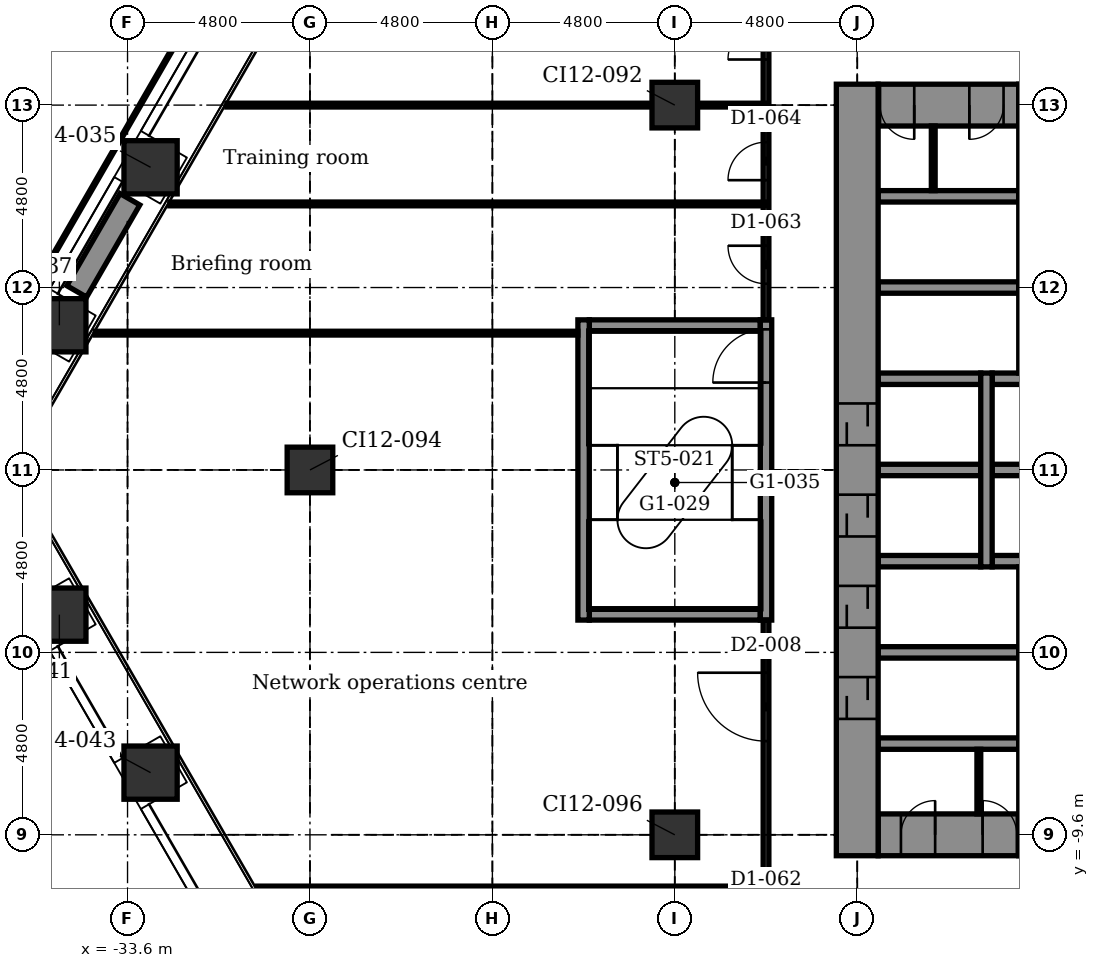
"""IFC4 building model, lengths in metres.
Left out: names, types, materials, properties, quantities, classifications, styles, units other than length and angle.
Written with IfcOpenShell. Run it as: python <this file> out.ifc"""

import sys

from ifc_helpers import new_model, si_unit, direction, frame, frame_2d, origin, origin_2d, place, context, subcontext, project, spatial, rectangle, extrude, element, fill, save


model = new_model("IFC4")
c1 = context("Model", 3, precision=1e-05, world=origin(), true_north=direction((0.0, 1.0)))
c2 = subcontext(c1, "Body", "Model", "MODEL_VIEW")
j1 = project(units=[si_unit("LENGTHUNIT", "METRE"), si_unit("PLANEANGLEUNIT", "RADIAN")], contexts=[c1])
p1 = place(None, origin())
s1 = spatial("IfcSite", under=j1, at=p1, CompositionType="ELEMENT")
p2 = place(p1, origin())
s2 = spatial("IfcBuilding", under=s1, at=p2, CompositionType="ELEMENT")
p3 = place(p2, frame((0.0, 0.0, 17.4)))
s3 = spatial("IfcBuildingStorey", under=s2, at=p3, CompositionType="ELEMENT", Elevation=17.4)
for number, where, z_axis, x_axis in (
    (1, (-32.994, -7.964, -0.25), (0.0, 0.0, 1.0), (0.866, 0.5, 0.0)),
    (2, (-35.394, -3.807, -0.25), (0.0, 0.0, 1.0), (0.866, 0.5, 0.0)),
    (3, (-35.394, 3.807, -0.25), (0.0, 0.0, 1.0), (0.5, 0.866, 0.0)),
    (4, (-32.994, 7.964, -0.25), (0.0, 0.0, 1.0), (0.5, 0.866, 0.0)),
):
    element("IfcColumn", number, at=place(p3, frame(where, z_axis=z_axis, x_axis=x_axis)), inside=s3, PredefinedType="COLUMN", context=c2, shape_type="SweptSolid", body=[
        extrude(rectangle(XDim=1.4, YDim=1.4, at=origin_2d()), origin(), (0.0, 0.0, 1.0), 5.0),
    ])
for number, where, z_axis, x_axis in (
    (5, (-28.8, 0.0, -0.25), (0.0, 0.0, 1.0), (1.0, 0.0, 0.0)),
    (6, (-19.2, -9.6, -0.25), (0.0, 0.0, 1.0), (1.0, 0.0, 0.0)),
    (7, (-19.2, 9.6, -0.25), (0.0, 0.0, 1.0), (1.0, 0.0, 0.0)),
):
    element("IfcColumn", number, at=place(p3, frame(where, z_axis=z_axis, x_axis=x_axis)), inside=s3, PredefinedType="COLUMN", context=c2, shape_type="SweptSolid", body=[
        extrude(rectangle(XDim=1.2, YDim=1.2, at=origin_2d()), origin(), (0.0, 0.0, 1.0), 5.0),
    ])
p4 = place(p3, frame((-13.85, -9.6, -0.25), z_axis=(0.0, 0.0, 1.0), x_axis=(1.0, 0.0, 0.0)))
e8 = element("IfcWall", 8, at=p4, inside=s3, PredefinedType="SHEAR", context=c2, shape_type="SweptSolid", body=[
    extrude(rectangle(XDim=3.7, YDim=1.1, at=frame_2d((1.85, 0.0))), origin(), (0.0, 0.0, 1.0), 5.0),
])
p5 = place(p4, frame((0.6, 0.0, 0.25)))
e9 = element("IfcOpeningElement", 9, at=p5, cuts=e8, PredefinedType="OPENING", context=c2, shape_type="SweptSolid", body=[
    extrude(rectangle(XDim=0.9, YDim=2.1, at=frame_2d((0.45, 1.05))), frame((0.0, 0.56, 0.0), z_axis=(0.0, -1.0, 0.0), x_axis=(1.0, 0.0, 0.0)), (0.0, 0.0, 1.0), 1.12),
])
p6 = place(p4, frame((2.75, 0.0, 0.25)))
e10 = element("IfcOpeningElement", 10, at=p6, cuts=e8, PredefinedType="OPENING", context=c2, shape_type="SweptSolid", body=[
    extrude(rectangle(XDim=0.9, YDim=2.1, at=frame_2d((0.45, 1.05))), frame((0.0, 0.56, 0.0), z_axis=(0.0, -1.0, 0.0), x_axis=(1.0, 0.0, 0.0)), (0.0, 0.0, 1.0), 1.12),
])
for number, where, z_axis, x_axis in (
    (11, (-13.85, -7.2, -0.25), (0.0, 0.0, 1.0), (1.0, 0.0, 0.0)),
    (12, (-13.85, -4.8, -0.25), (0.0, 0.0, 1.0), (1.0, 0.0, 0.0)),
):
    element("IfcWall", number, at=place(p3, frame(where, z_axis=z_axis, x_axis=x_axis)), inside=s3, PredefinedType="STANDARD", context=c2, shape_type="SweptSolid", body=[
        extrude(rectangle(XDim=3.7, YDim=0.3, at=frame_2d((1.85, 0.0))), origin(), (0.0, 0.0, 1.0), 5.0),
    ])
p7 = place(p3, frame((-21.45, -3.8, -0.25), z_axis=(0.0, 0.0, 1.0), x_axis=(1.0, 0.0, 0.0)))
e13 = element("IfcWall", 13, at=p7, inside=s3, PredefinedType="STANDARD", context=c2, shape_type="SweptSolid", body=[
    extrude(rectangle(XDim=4.5, YDim=0.3, at=frame_2d((2.25, 0.0))), origin(), (0.0, 0.0, 1.0), 5.0),
])
p8 = place(p3, frame((-13.85, -2.4, -0.25), z_axis=(0.0, 0.0, 1.0), x_axis=(1.0, 0.0, 0.0)))
e14 = element("IfcWall", 14, at=p8, inside=s3, PredefinedType="STANDARD", context=c2, shape_type="SweptSolid", body=[
    extrude(rectangle(XDim=2.7, YDim=0.3, at=frame_2d((1.35, 0.0))), origin(), (0.0, 0.0, 1.0), 5.0),
])
p9 = place(p3, frame((-10.85, -2.4, -0.25), z_axis=(0.0, 0.0, 1.0), x_axis=(1.0, 0.0, 0.0)))
e15 = element("IfcWall", 15, at=p9, inside=s3, PredefinedType="STANDARD", context=c2, shape_type="SweptSolid", body=[
    extrude(rectangle(XDim=1.1, YDim=0.3, at=frame_2d((0.55, 0.0))), origin(), (0.0, 0.0, 1.0), 5.0),
])
p10 = place(p3, frame((-13.85, 0.0, -0.25), z_axis=(0.0, 0.0, 1.0), x_axis=(1.0, 0.0, 0.0)))
e16 = element("IfcWall", 16, at=p10, inside=s3, PredefinedType="STANDARD", context=c2, shape_type="SweptSolid", body=[
    extrude(rectangle(XDim=2.7, YDim=0.3, at=frame_2d((1.35, 0.0))), origin(), (0.0, 0.0, 1.0), 5.0),
])
p11 = place(p3, frame((-10.85, 0.0, -0.25), z_axis=(0.0, 0.0, 1.0), x_axis=(1.0, 0.0, 0.0)))
e17 = element("IfcWall", 17, at=p11, inside=s3, PredefinedType="STANDARD", context=c2, shape_type="SweptSolid", body=[
    extrude(rectangle(XDim=3.3, YDim=0.3, at=frame_2d((1.65, 0.0))), origin(), (0.0, 0.0, 1.0), 5.0),
])
p12 = place(p3, frame((-13.85, 2.4, -0.25), z_axis=(0.0, 0.0, 1.0), x_axis=(1.0, 0.0, 0.0)))
e18 = element("IfcWall", 18, at=p12, inside=s3, PredefinedType="STANDARD", context=c2, shape_type="SweptSolid", body=[
    extrude(rectangle(XDim=2.7, YDim=0.3, at=frame_2d((1.35, 0.0))), origin(), (0.0, 0.0, 1.0), 5.0),
])
p13 = place(p3, frame((-10.85, 2.4, -0.25), z_axis=(0.0, 0.0, 1.0), x_axis=(1.0, 0.0, 0.0)))
e19 = element("IfcWall", 19, at=p13, inside=s3, PredefinedType="STANDARD", context=c2, shape_type="SweptSolid", body=[
    extrude(rectangle(XDim=1.1, YDim=0.3, at=frame_2d((0.55, 0.0))), origin(), (0.0, 0.0, 1.0), 5.0),
])
p14 = place(p3, frame((-21.45, 3.8, -0.25), z_axis=(0.0, 0.0, 1.0), x_axis=(1.0, 0.0, 0.0)))
e20 = element("IfcWall", 20, at=p14, inside=s3, PredefinedType="STANDARD", context=c2, shape_type="SweptSolid", body=[
    extrude(rectangle(XDim=4.5, YDim=0.3, at=frame_2d((2.25, 0.0))), origin(), (0.0, 0.0, 1.0), 5.0),
])
for number, where, z_axis, x_axis in (
    (21, (-13.85, 4.8, -0.25), (0.0, 0.0, 1.0), (1.0, 0.0, 0.0)),
    (22, (-13.85, 7.2, -0.25), (0.0, 0.0, 1.0), (1.0, 0.0, 0.0)),
):
    element("IfcWall", number, at=place(p3, frame(where, z_axis=z_axis, x_axis=x_axis)), inside=s3, PredefinedType="STANDARD", context=c2, shape_type="SweptSolid", body=[
        extrude(rectangle(XDim=3.7, YDim=0.3, at=frame_2d((1.85, 0.0))), origin(), (0.0, 0.0, 1.0), 5.0),
    ])
p15 = place(p3, frame((-13.85, 9.6, -0.25), z_axis=(0.0, 0.0, 1.0), x_axis=(1.0, 0.0, 0.0)))
e23 = element("IfcWall", 23, at=p15, inside=s3, PredefinedType="SHEAR", context=c2, shape_type="SweptSolid", body=[
    extrude(rectangle(XDim=3.7, YDim=1.1, at=frame_2d((1.85, 0.0))), origin(), (0.0, 0.0, 1.0), 5.0),
])
p16 = place(p15, frame((0.05, 0.0, 0.25)))
e24 = element("IfcOpeningElement", 24, at=p16, cuts=e23, PredefinedType="OPENING", context=c2, shape_type="SweptSolid", body=[
    extrude(rectangle(XDim=0.9, YDim=2.1, at=frame_2d((0.45, 1.05))), frame((0.0, 0.56, 0.0), z_axis=(0.0, -1.0, 0.0), x_axis=(1.0, 0.0, 0.0)), (0.0, 0.0, 1.0), 1.12),
])
p17 = place(p15, frame((2.4, 0.0, 0.25)))
e25 = element("IfcOpeningElement", 25, at=p17, cuts=e23, PredefinedType="OPENING", context=c2, shape_type="SweptSolid", body=[
    extrude(rectangle(XDim=0.9, YDim=2.1, at=frame_2d((0.45, 1.05))), frame((0.0, 0.56, 0.0), z_axis=(0.0, -1.0, 0.0), x_axis=(1.0, 0.0, 0.0)), (0.0, 0.0, 1.0), 1.12),
])
p18 = place(p3, frame((-21.6, -3.95, -0.25), z_axis=(0.0, 0.0, 1.0), x_axis=(0.0, 1.0, 0.0)))
e26 = element("IfcWall", 26, at=p18, inside=s3, PredefinedType="STANDARD", context=c2, shape_type="SweptSolid", body=[
    extrude(rectangle(XDim=7.9, YDim=0.3, at=frame_2d((3.95, 0.0))), origin(), (0.0, 0.0, 1.0), 5.0),
])
p19 = place(p3, frame((-16.8, -3.95, -0.25), z_axis=(0.0, 0.0, 1.0), x_axis=(0.0, 1.0, 0.0)))
e27 = element("IfcWall", 27, at=p19, inside=s3, PredefinedType="STANDARD", context=c2, shape_type="SweptSolid", body=[
    extrude(rectangle(XDim=7.9, YDim=0.3, at=frame_2d((3.95, 0.0))), origin(), (0.0, 0.0, 1.0), 5.0),
])
p20 = place(p19, frame((6.25, 0.0, 0.25)))
e28 = element("IfcOpeningElement", 28, at=p20, cuts=e27, PredefinedType="OPENING", context=c2, shape_type="SweptSolid", body=[
    extrude(rectangle(XDim=1.4, YDim=2.1, at=frame_2d((0.7, 1.05))), frame((0.0, 0.16, 0.0), z_axis=(0.0, -1.0, 0.0), x_axis=(1.0, 0.0, 0.0)), (0.0, 0.0, 1.0), 0.32),
])
p21 = place(p3, frame((-14.4, -10.15, -0.25), z_axis=(0.0, 0.0, 1.0), x_axis=(0.0, 1.0, 0.0)))
e29 = element("IfcWall", 29, at=p21, inside=s3, PredefinedType="SHEAR", context=c2, shape_type="SweptSolid", body=[
    extrude(rectangle(XDim=20.3, YDim=1.1, at=frame_2d((10.15, 0.0))), origin(), (0.0, 0.0, 1.0), 5.0),
])
p22 = place(p21, frame((3.6, 0.0, 0.25)))
e30 = element("IfcOpeningElement", 30, at=p22, cuts=e29, PredefinedType="OPENING", context=c2, shape_type="SweptSolid", body=[
    extrude(rectangle(XDim=1.1, YDim=2.1, at=frame_2d((0.55, 1.05))), frame((0.0, 0.56, 0.0), z_axis=(0.0, -1.0, 0.0), x_axis=(1.0, 0.0, 0.0)), (0.0, 0.0, 1.0), 1.12),
])
p23 = place(p21, frame((6.0, 0.0, 0.25)))
e31 = element("IfcOpeningElement", 31, at=p23, cuts=e29, PredefinedType="OPENING", context=c2, shape_type="SweptSolid", body=[
    extrude(rectangle(XDim=1.1, YDim=2.1, at=frame_2d((0.55, 1.05))), frame((0.0, 0.56, 0.0), z_axis=(0.0, -1.0, 0.0), x_axis=(1.0, 0.0, 0.0)), (0.0, 0.0, 1.0), 1.12),
])
p24 = place(p21, frame((8.4, 0.0, 0.25)))
e32 = element("IfcOpeningElement", 32, at=p24, cuts=e29, PredefinedType="OPENING", context=c2, shape_type="SweptSolid", body=[
    extrude(rectangle(XDim=1.1, YDim=2.1, at=frame_2d((0.55, 1.05))), frame((0.0, 0.56, 0.0), z_axis=(0.0, -1.0, 0.0), x_axis=(1.0, 0.0, 0.0)), (0.0, 0.0, 1.0), 1.12),
])
p25 = place(p21, frame((10.8, 0.0, 0.25)))
e33 = element("IfcOpeningElement", 33, at=p25, cuts=e29, PredefinedType="OPENING", context=c2, shape_type="SweptSolid", body=[
    extrude(rectangle(XDim=1.1, YDim=2.1, at=frame_2d((0.55, 1.05))), frame((0.0, 0.56, 0.0), z_axis=(0.0, -1.0, 0.0), x_axis=(1.0, 0.0, 0.0)), (0.0, 0.0, 1.0), 1.12),
])
p26 = place(p3, frame((-11.0, -2.55, -0.25), z_axis=(0.0, 0.0, 1.0), x_axis=(0.0, 1.0, 0.0)))
e34 = element("IfcWall", 34, at=p26, inside=s3, PredefinedType="STANDARD", context=c2, shape_type="SweptSolid", body=[
    extrude(rectangle(XDim=5.1, YDim=0.3, at=frame_2d((2.55, 0.0))), origin(), (0.0, 0.0, 1.0), 5.0),
])
for number, where, z_axis, x_axis in (
    (35, (-9.6, -10.15, -0.25), (0.0, 0.0, 1.0), (0.0, 1.0, 0.0)),
    (36, (-9.6, 2.55, -0.25), (0.0, 0.0, 1.0), (0.0, 1.0, 0.0)),
):
    element("IfcWall", number, at=place(p3, frame(where, z_axis=z_axis, x_axis=x_axis)), inside=s3, PredefinedType="SHEAR", context=c2, shape_type="SweptSolid", body=[
        extrude(rectangle(XDim=7.6, YDim=1.1, at=frame_2d((3.8, 0.0))), origin(), (0.0, 0.0, 1.0), 5.0),
    ])
p27 = place(p3, frame((-34.937, 4.698, 0.0), z_axis=(0.0, 0.0, 1.0), x_axis=(0.49998411664, 0.866034573852, 0.0)))
e37 = element("IfcWall", 37, at=p27, inside=s3, PredefinedType="USERDEFINED", context=c2, shape_type="SweptSolid", body=[
    extrude(rectangle(XDim=2.8, YDim=0.6, at=frame_2d((1.4, 0.0))), origin(), (0.0, 0.0, 1.0), 0.7),
])
for number, where, z_axis, x_axis in (
    (38, (-11.2, -9.05, 0.0), (0.0, 0.0, 1.0), (0.0, 1.0, 0.0)),
    (39, (-12.4, 7.35, 0.0), (0.0, 0.0, 1.0), (0.0, 1.0, 0.0)),
):
    element("IfcWall", number, at=place(p3, frame(where, z_axis=z_axis, x_axis=x_axis)), inside=s3, PredefinedType="PARTITIONING", context=c2, shape_type="SweptSolid", body=[
        extrude(rectangle(XDim=1.7, YDim=0.1, at=frame_2d((0.85, 0.0))), origin(), (0.0, 0.0, 1.0), 4.75),
    ])
p28 = place(p3, frame((-16.8, -13.0, 0.0), z_axis=(0.0, 0.0, 1.0), x_axis=(0.0, 1.0, 0.0)))
e40 = element("IfcWall", 40, at=p28, inside=s3, PredefinedType="PARTITIONING", context=c2, shape_type="SweptSolid", body=[
    extrude(rectangle(XDim=9.05, YDim=0.15, at=frame_2d((4.525, 0.0))), origin(), (0.0, 0.0, 1.0), 4.75),
])
p29 = place(p28, frame((0.6, 0.0, 0.0)))
e41 = element("IfcOpeningElement", 41, at=p29, cuts=e40, PredefinedType="OPENING", context=c2, shape_type="SweptSolid", body=[
    extrude(rectangle(XDim=1.0, YDim=2.1, at=frame_2d((0.5, 1.05))), frame((0.0, 0.085, 0.0), z_axis=(0.0, -1.0, 0.0), x_axis=(1.0, 0.0, 0.0)), (0.0, 0.0, 1.0), 0.17),
])
p30 = place(p28, frame((5.865, 0.0, 0.0)))
e42 = element("IfcOpeningElement", 42, at=p30, cuts=e40, PredefinedType="OPENING", context=c2, shape_type="SweptSolid", body=[
    extrude(rectangle(XDim=1.8, YDim=2.1, at=frame_2d((0.9, 1.05))), frame((0.0, 0.085, 0.0), z_axis=(0.0, -1.0, 0.0), x_axis=(1.0, 0.0, 0.0)), (0.0, 0.0, 1.0), 0.17),
])
p31 = place(p3, frame((-16.8, 3.95, 0.0), z_axis=(0.0, 0.0, 1.0), x_axis=(0.0, 1.0, 0.0)))
e43 = element("IfcWall", 43, at=p31, inside=s3, PredefinedType="PARTITIONING", context=c2, shape_type="SweptSolid", body=[
    extrude(rectangle(XDim=9.35, YDim=0.15, at=frame_2d((4.675, 0.0))), origin(), (0.0, 0.0, 1.0), 4.75),
])
p32 = place(p31, frame((0.95, 0.0, 0.0)))
e44 = element("IfcOpeningElement", 44, at=p32, cuts=e43, PredefinedType="OPENING", context=c2, shape_type="SweptSolid", body=[
    extrude(rectangle(XDim=1.0, YDim=2.1, at=frame_2d((0.5, 1.05))), frame((0.0, 0.085, 0.0), z_axis=(0.0, -1.0, 0.0), x_axis=(1.0, 0.0, 0.0)), (0.0, 0.0, 1.0), 0.17),
])
p33 = place(p31, frame((3.675, 0.0, 0.0)))
e45 = element("IfcOpeningElement", 45, at=p33, cuts=e43, PredefinedType="OPENING", context=c2, shape_type="SweptSolid", body=[
    extrude(rectangle(XDim=1.0, YDim=2.1, at=frame_2d((0.5, 1.05))), frame((0.0, 0.085, 0.0), z_axis=(0.0, -1.0, 0.0), x_axis=(1.0, 0.0, 0.0)), (0.0, 0.0, 1.0), 0.17),
])
p34 = place(p31, frame((6.85, 0.0, 0.0)))
e46 = element("IfcOpeningElement", 46, at=p34, cuts=e43, PredefinedType="OPENING", context=c2, shape_type="SweptSolid", body=[
    extrude(rectangle(XDim=1.0, YDim=2.1, at=frame_2d((0.5, 1.05))), frame((0.0, 0.085, 0.0), z_axis=(0.0, -1.0, 0.0), x_axis=(1.0, 0.0, 0.0)), (0.0, 0.0, 1.0), 0.17),
])
p35 = place(p3, frame((-30.178, -11.0, 0.0), z_axis=(0.0, 0.0, 1.0), x_axis=(1.0, 0.0, 0.0)))
e47 = element("IfcWall", 47, at=p35, inside=s3, PredefinedType="PARTITIONING", context=c2, shape_type="SweptSolid", body=[
    extrude(rectangle(XDim=13.378, YDim=0.1, at=frame_2d((6.689, 0.0))), origin(), (0.0, 0.0, 1.0), 4.75),
])
p36 = place(p3, frame((-34.451, 3.6, 0.0), z_axis=(0.0, 0.0, 1.0), x_axis=(1.0, 0.0, 0.0)))
e48 = element("IfcWall", 48, at=p36, inside=s3, PredefinedType="PARTITIONING", context=c2, shape_type="SweptSolid", body=[
    extrude(rectangle(XDim=12.701, YDim=0.1, at=frame_2d((6.351, 0.0))), origin(), (0.0, 0.0, 1.0), 4.75),
])
p37 = place(p3, frame((-32.488, 7.0, 0.0), z_axis=(0.0, 0.0, 1.0), x_axis=(1.0, 0.0, 0.0)))
e49 = element("IfcWall", 49, at=p37, inside=s3, PredefinedType="PARTITIONING", context=c2, shape_type="SweptSolid", body=[
    extrude(rectangle(XDim=15.688, YDim=0.1, at=frame_2d((7.844, 0.0))), origin(), (0.0, 0.0, 1.0), 4.75),
])
p38 = place(p3, frame((-30.987, 9.6, 0.0), z_axis=(0.0, 0.0, 1.0), x_axis=(1.0, 0.0, 0.0)))
e50 = element("IfcWall", 50, at=p38, inside=s3, PredefinedType="PARTITIONING", context=c2, shape_type="SweptSolid", body=[
    extrude(rectangle(XDim=11.187, YDim=0.1, at=frame_2d((5.593, 0.0))), origin(), (0.0, 0.0, 1.0), 3.988),
])
p39 = place(p3, frame((-18.6, 9.6, 0.0), z_axis=(0.0, 0.0, 1.0), x_axis=(1.0, 0.0, 0.0)))
e51 = element("IfcWall", 51, at=p39, inside=s3, PredefinedType="PARTITIONING", context=c2, shape_type="SweptSolid", body=[
    extrude(rectangle(XDim=1.8, YDim=0.1, at=frame_2d((0.9, 0.0))), origin(), (0.0, 0.0, 1.0), 4.142),
])
p40 = place(p30, origin())
e52 = element("IfcDoor", 52, at=p40, inside=s3, OperationType="SINGLE_SWING_RIGHT", PredefinedType="DOOR", context=c2, shape_type="SweptSolid", body=[
    extrude(rectangle(XDim=1.8, YDim=2.1, at=frame_2d((0.9, 1.05))), frame((0.0, 0.025, 0.0), z_axis=(0.0, -1.0, 0.0), x_axis=(1.0, 0.0, 0.0)), (0.0, 0.0, 1.0), 0.05),
])
fill(e42, e52)
p41 = place(p32, origin())
e53 = element("IfcDoor", 53, at=p41, inside=s3, OperationType="SINGLE_SWING_RIGHT", PredefinedType="DOOR", context=c2, shape_type="SweptSolid", body=[
    extrude(rectangle(XDim=1.0, YDim=2.1, at=frame_2d((0.5, 1.05))), frame((0.0, 0.025, 0.0), z_axis=(0.0, -1.0, 0.0), x_axis=(1.0, 0.0, 0.0)), (0.0, 0.0, 1.0), 0.05),
])
fill(e44, e53)
p42 = place(p33, origin())
e54 = element("IfcDoor", 54, at=p42, inside=s3, OperationType="SINGLE_SWING_LEFT", PredefinedType="DOOR", context=c2, shape_type="SweptSolid", body=[
    extrude(rectangle(XDim=1.0, YDim=2.1, at=frame_2d((0.5, 1.05))), frame((0.0, 0.025, 0.0), z_axis=(0.0, -1.0, 0.0), x_axis=(1.0, 0.0, 0.0)), (0.0, 0.0, 1.0), 0.05),
])
fill(e45, e54)
p43 = place(p34, origin())
e55 = element("IfcDoor", 55, at=p43, inside=s3, OperationType="SINGLE_SWING_LEFT", PredefinedType="DOOR", context=c2, shape_type="SweptSolid", body=[
    extrude(rectangle(XDim=1.0, YDim=2.1, at=frame_2d((0.5, 1.05))), frame((0.0, 0.025, 0.0), z_axis=(0.0, -1.0, 0.0), x_axis=(1.0, 0.0, 0.0)), (0.0, 0.0, 1.0), 0.05),
])
fill(e46, e55)
p44 = place(p22, origin())
e56 = element("IfcDoor", 56, at=p44, inside=s3, OperationType="DOUBLE_DOOR_SLIDING", PredefinedType="DOOR", context=c2, shape_type="SweptSolid", body=[
    extrude(rectangle(XDim=1.1, YDim=2.1, at=frame_2d((0.55, 1.05))), frame((0.0, 0.025, 0.0), z_axis=(0.0, -1.0, 0.0), x_axis=(1.0, 0.0, 0.0)), (0.0, 0.0, 1.0), 0.05),
])
fill(e30, e56)
p45 = place(p23, origin())
e57 = element("IfcDoor", 57, at=p45, inside=s3, OperationType="DOUBLE_DOOR_SLIDING", PredefinedType="DOOR", context=c2, shape_type="SweptSolid", body=[
    extrude(rectangle(XDim=1.1, YDim=2.1, at=frame_2d((0.55, 1.05))), frame((0.0, 0.025, 0.0), z_axis=(0.0, -1.0, 0.0), x_axis=(1.0, 0.0, 0.0)), (0.0, 0.0, 1.0), 0.05),
])
fill(e31, e57)
p46 = place(p24, origin())
e58 = element("IfcDoor", 58, at=p46, inside=s3, OperationType="DOUBLE_DOOR_SLIDING", PredefinedType="DOOR", context=c2, shape_type="SweptSolid", body=[
    extrude(rectangle(XDim=1.1, YDim=2.1, at=frame_2d((0.55, 1.05))), frame((0.0, 0.025, 0.0), z_axis=(0.0, -1.0, 0.0), x_axis=(1.0, 0.0, 0.0)), (0.0, 0.0, 1.0), 0.05),
])
fill(e32, e58)
p47 = place(p25, origin())
e59 = element("IfcDoor", 59, at=p47, inside=s3, OperationType="DOUBLE_DOOR_SLIDING", PredefinedType="DOOR", context=c2, shape_type="SweptSolid", body=[
    extrude(rectangle(XDim=1.1, YDim=2.1, at=frame_2d((0.55, 1.05))), frame((0.0, 0.025, 0.0), z_axis=(0.0, -1.0, 0.0), x_axis=(1.0, 0.0, 0.0)), (0.0, 0.0, 1.0), 0.05),
])
fill(e33, e59)
p48 = place(p20, origin())
e60 = element("IfcDoor", 60, at=p48, inside=s3, OperationType="SINGLE_SWING_LEFT", PredefinedType="DOOR", context=c2, shape_type="SweptSolid", body=[
    extrude(rectangle(XDim=1.4, YDim=2.1, at=frame_2d((0.7, 1.05))), frame((0.0, 0.025, 0.0), z_axis=(0.0, -1.0, 0.0), x_axis=(1.0, 0.0, 0.0)), (0.0, 0.0, 1.0), 0.05),
])
fill(e28, e60)
p49 = place(p5, origin())
e61 = element("IfcDoor", 61, at=p49, inside=s3, OperationType="SINGLE_SWING_RIGHT", PredefinedType="DOOR", context=c2, shape_type="SweptSolid", body=[
    extrude(rectangle(XDim=0.9, YDim=2.1, at=frame_2d((0.45, 1.05))), frame((0.0, 0.025, 0.0), z_axis=(0.0, -1.0, 0.0), x_axis=(1.0, 0.0, 0.0)), (0.0, 0.0, 1.0), 0.05),
])
fill(e9, e61)
p50 = place(p6, origin())
e62 = element("IfcDoor", 62, at=p50, inside=s3, OperationType="SINGLE_SWING_LEFT", PredefinedType="DOOR", context=c2, shape_type="SweptSolid", body=[
    extrude(rectangle(XDim=0.9, YDim=2.1, at=frame_2d((0.45, 1.05))), frame((0.0, 0.025, 0.0), z_axis=(0.0, -1.0, 0.0), x_axis=(1.0, 0.0, 0.0)), (0.0, 0.0, 1.0), 0.05),
])
fill(e10, e62)
p51 = place(p16, frame((0.9, 0.0, 0.0), z_axis=(0.0, 0.0, 1.0), x_axis=(-1.0, 0.0, 0.0)))
e63 = element("IfcDoor", 63, at=p51, inside=s3, OperationType="SINGLE_SWING_RIGHT", PredefinedType="DOOR", context=c2, shape_type="SweptSolid", body=[
    extrude(rectangle(XDim=0.9, YDim=2.1, at=frame_2d((0.45, 1.05))), frame((0.0, 0.025, 0.0), z_axis=(0.0, -1.0, 0.0), x_axis=(1.0, 0.0, 0.0)), (0.0, 0.0, 1.0), 0.05),
])
fill(e24, e63)
p52 = place(p17, frame((0.9, 0.0, 0.0), z_axis=(0.0, 0.0, 1.0), x_axis=(-1.0, 0.0, 0.0)))
e64 = element("IfcDoor", 64, at=p52, inside=s3, OperationType="SINGLE_SWING_LEFT", PredefinedType="DOOR", context=c2, shape_type="SweptSolid", body=[
    extrude(rectangle(XDim=0.9, YDim=2.1, at=frame_2d((0.45, 1.05))), frame((0.0, 0.025, 0.0), z_axis=(0.0, -1.0, 0.0), x_axis=(1.0, 0.0, 0.0)), (0.0, 0.0, 1.0), 0.05),
])
fill(e25, e64)
save(model, sys.argv[1])
